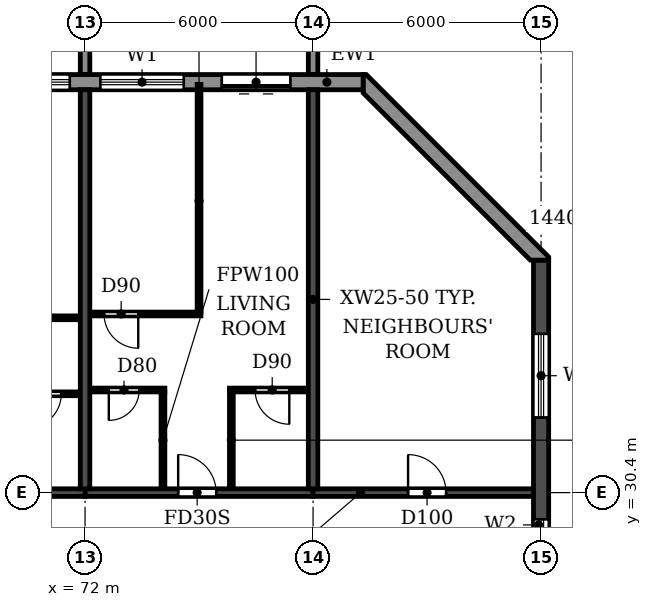
"""IFC4 building model, lengths in metres.
Left out: names, types, materials, properties, quantities, classifications, styles, units other than length and angle.
Written with IfcOpenShell. Run it as: python <this file> out.ifc"""

import sys

from ifc_helpers import new_model, si_unit, direction, frame, frame_2d, origin, place, context, subcontext, project, spatial, polyline, rectangle, outline, extrude, source, transform, mapped, element, fill, save


model = new_model("IFC4")
c1 = context("Model", 3, precision=1e-05, world=origin(), true_north=direction((0.0, 1.0)))
c2 = subcontext(c1, "Body", "Model", "MODEL_VIEW")
j1 = project(units=[si_unit("LENGTHUNIT", "METRE"), si_unit("PLANEANGLEUNIT", "RADIAN")], contexts=[c1])
p1 = place(None, origin())
s1 = spatial("IfcSite", under=j1, at=p1, CompositionType="ELEMENT")
p2 = place(p1, origin())
s2 = spatial("IfcBuilding", under=s1, at=p2, CompositionType="ELEMENT")
p3 = place(p2, frame((0.0, 0.0, 171.9)))
s3 = spatial("IfcBuildingStorey", under=s2, at=p3, CompositionType="ELEMENT", Elevation=171.9)
for number, where, z_axis, x_axis in (
    (1, (72.0, 30.5, 0.0), (0.0, 0.0, 1.0), (0.0, 1.0, 0.0)),
    (2, (78.0, 30.5, 0.0), (0.0, 0.0, 1.0), (0.0, 1.0, 0.0)),
):
    element("IfcWall", number, at=place(p3, frame(where, z_axis=z_axis, x_axis=x_axis)), inside=s3, PredefinedType="SHEAR", context=c2, shape_type="SweptSolid", body=[
        extrude(rectangle(XDim=10.5, YDim=0.25, at=frame_2d((5.25, 0.0))), origin(), (0.0, 0.0, 1.0), 3.08),
    ])
p4 = place(p3, frame((84.0, 4.683, 0.0), z_axis=(0.0, 0.0, 1.0), x_axis=(0.0, 1.0, 0.0)))
e3 = element("IfcWall", 3, at=p4, inside=s3, PredefinedType="SHEAR", context=c2, shape_type="SweptSolid", body=[
    extrude(rectangle(XDim=31.834, YDim=0.4, at=frame_2d((15.917, 0.0))), origin(), (0.0, 0.0, 1.0), 3.08),
])
p5 = place(p4, frame((23.817, 0.0, 0.9)))
e4 = element("IfcOpeningElement", 4, at=p5, cuts=e3, PredefinedType="OPENING", context=c2, shape_type="SweptSolid", body=[
    extrude(rectangle(XDim=1.2, YDim=1.5, at=frame_2d((0.6, 0.75))), frame((0.0, 0.21, 0.0), z_axis=(0.0, -1.0, 0.0), x_axis=(1.0, 0.0, 0.0)), (0.0, 0.0, 1.0), 0.42),
])
p6 = place(p4, frame((8.017, 0.0, 0.9)))
e5 = element("IfcOpeningElement", 5, at=p6, cuts=e3, PredefinedType="OPENING", context=c2, shape_type="SweptSolid", body=[
    extrude(rectangle(XDim=1.2, YDim=1.5, at=frame_2d((0.6, 0.75))), frame((0.0, 0.21, 0.0), z_axis=(0.0, -1.0, 0.0), x_axis=(1.0, 0.0, 0.0)), (0.0, 0.0, 1.0), 0.42),
])
p7 = place(p4, frame((27.694, 0.0, 0.6)))
e6 = element("IfcOpeningElement", 6, at=p7, cuts=e3, PredefinedType="OPENING", context=c2, shape_type="SweptSolid", body=[
    extrude(rectangle(XDim=2.2, YDim=1.8, at=frame_2d((1.1, 0.9))), frame((0.0, 0.21, 0.0), z_axis=(0.0, -1.0, 0.0), x_axis=(1.0, 0.0, 0.0)), (0.0, 0.0, 1.0), 0.42),
])
p8 = place(p4, frame((2.541, 0.0, 0.6)))
e7 = element("IfcOpeningElement", 7, at=p8, cuts=e3, PredefinedType="OPENING", context=c2, shape_type="SweptSolid", body=[
    extrude(rectangle(XDim=2.2, YDim=1.8, at=frame_2d((1.1, 0.9))), frame((0.0, 0.21, 0.0), z_axis=(0.0, -1.0, 0.0), x_axis=(1.0, 0.0, 0.0)), (0.0, 0.0, 1.0), 0.42),
])
p9 = place(p4, frame((15.917, 0.0, 0.9)))
e8 = element("IfcOpeningElement", 8, at=p9, cuts=e3, PredefinedType="OPENING", context=c2, shape_type="SweptSolid", body=[
    extrude(rectangle(XDim=1.2, YDim=1.5, at=frame_2d((0.6, 0.75))), frame((0.0, 0.21, 0.0), z_axis=(0.0, -1.0, 0.0), x_axis=(1.0, 0.0, 0.0)), (0.0, 0.0, 1.0), 0.42),
])
p10 = place(p3, frame((66.0, 30.4, 0.0), z_axis=(0.0, 0.0, 1.0), x_axis=(1.0, 0.0, 0.0)))
e9 = element("IfcWall", 9, at=p10, inside=s3, PredefinedType="SHEAR", context=c2, shape_type="SweptSolid", body=[
    extrude(rectangle(XDim=6.0, YDim=0.2, at=frame_2d((3.0, 0.0))), origin(), (0.0, 0.0, 1.0), 2.48),
])
p11 = place(p10, frame((2.45, 0.0, 0.0)))
e10 = element("IfcOpeningElement", 10, at=p11, cuts=e9, PredefinedType="OPENING", context=c2, shape_type="SweptSolid", body=[
    extrude(rectangle(XDim=1.0, YDim=2.1, at=frame_2d((0.5, 1.05))), frame((0.0, 0.11, 0.0), z_axis=(0.0, -1.0, 0.0), x_axis=(1.0, 0.0, 0.0)), (0.0, 0.0, 1.0), 0.22),
])
p12 = place(p3, frame((72.0, 30.4, 0.0), z_axis=(0.0, 0.0, 1.0), x_axis=(1.0, 0.0, 0.0)))
e11 = element("IfcWall", 11, at=p12, inside=s3, PredefinedType="SHEAR", context=c2, shape_type="SweptSolid", body=[
    extrude(rectangle(XDim=6.0, YDim=0.2, at=frame_2d((3.0, 0.0))), origin(), (0.0, 0.0, 1.0), 2.48),
])
p13 = place(p12, frame((2.45, 0.0, 0.0)))
e12 = element("IfcOpeningElement", 12, at=p13, cuts=e11, PredefinedType="OPENING", context=c2, shape_type="SweptSolid", body=[
    extrude(rectangle(XDim=1.0, YDim=2.1, at=frame_2d((0.5, 1.05))), frame((0.0, 0.11, 0.0), z_axis=(0.0, -1.0, 0.0), x_axis=(1.0, 0.0, 0.0)), (0.0, 0.0, 1.0), 0.22),
])
p14 = place(p3, frame((78.0, 30.4, 0.0), z_axis=(0.0, 0.0, 1.0), x_axis=(1.0, 0.0, 0.0)))
e13 = element("IfcWall", 13, at=p14, inside=s3, PredefinedType="SHEAR", context=c2, shape_type="SweptSolid", body=[
    extrude(rectangle(XDim=5.8, YDim=0.2, at=frame_2d((2.9, 0.0))), origin(), (0.0, 0.0, 1.0), 2.48),
])
p15 = place(p14, frame((2.5, 0.0, 0.0)))
e14 = element("IfcOpeningElement", 14, at=p15, cuts=e13, PredefinedType="OPENING", context=c2, shape_type="SweptSolid", body=[
    extrude(rectangle(XDim=1.0, YDim=2.1, at=frame_2d((0.5, 1.05))), frame((0.0, 0.11, 0.0), z_axis=(0.0, -1.0, 0.0), x_axis=(1.0, 0.0, 0.0)), (0.0, 0.0, 1.0), 0.22),
])
p16 = place(p3, origin())
e15 = element("IfcWall", 15, at=p16, inside=s3, PredefinedType="STANDARD", context=c2, shape_type="SweptSolid", body=[
    extrude(outline(polyline([(84.2, 36.517), (84.2, 36.6), (79.4, 41.4), (79.317, 41.4), (79.317, 40.917), (83.717, 36.517), (84.2, 36.517)])), origin(), (0.0, 0.0, 1.0), 3.08),
])
p17 = place(p3, frame((79.317, 41.2, 0.0), z_axis=(0.0, 0.0, 1.0), x_axis=(-1.0, 0.0, 0.0)))
e16 = element("IfcWall", 16, at=p17, inside=s3, PredefinedType="STANDARD", context=c2, shape_type="SweptSolid", body=[
    extrude(rectangle(XDim=56.634, YDim=0.4, at=frame_2d((28.317, 0.0))), origin(), (0.0, 0.0, 1.0), 3.08),
])
p18 = place(p17, frame((52.717, 0.0, 0.9)))
e17 = element("IfcOpeningElement", 17, at=p18, cuts=e16, PredefinedType="OPENING", context=c2, shape_type="SweptSolid", body=[
    extrude(rectangle(XDim=2.2, YDim=1.5, at=frame_2d((1.1, 0.75))), frame((0.0, 0.21, 0.0), z_axis=(0.0, -1.0, 0.0), x_axis=(1.0, 0.0, 0.0)), (0.0, 0.0, 1.0), 0.42),
])
p19 = place(p17, frame((49.917, 0.0, 0.0)))
e18 = element("IfcOpeningElement", 18, at=p19, cuts=e16, PredefinedType="OPENING", context=c2, shape_type="SweptSolid", body=[
    extrude(rectangle(XDim=1.8, YDim=2.4, at=frame_2d((0.9, 1.2))), frame((0.0, 0.21, 0.0), z_axis=(0.0, -1.0, 0.0), x_axis=(1.0, 0.0, 0.0)), (0.0, 0.0, 1.0), 0.42),
])
p20 = place(p17, frame((46.717, 0.0, 0.9)))
e19 = element("IfcOpeningElement", 19, at=p20, cuts=e16, PredefinedType="OPENING", context=c2, shape_type="SweptSolid", body=[
    extrude(rectangle(XDim=2.2, YDim=1.5, at=frame_2d((1.1, 0.75))), frame((0.0, 0.21, 0.0), z_axis=(0.0, -1.0, 0.0), x_axis=(1.0, 0.0, 0.0)), (0.0, 0.0, 1.0), 0.42),
])
p21 = place(p17, frame((43.717, 0.0, 0.9)))
e20 = element("IfcOpeningElement", 20, at=p21, cuts=e16, PredefinedType="OPENING", context=c2, shape_type="SweptSolid", body=[
    extrude(rectangle(XDim=2.2, YDim=1.5, at=frame_2d((1.1, 0.75))), frame((0.0, 0.21, 0.0), z_axis=(0.0, -1.0, 0.0), x_axis=(1.0, 0.0, 0.0)), (0.0, 0.0, 1.0), 0.42),
])
p22 = place(p17, frame((40.917, 0.0, 0.0)))
e21 = element("IfcOpeningElement", 21, at=p22, cuts=e16, PredefinedType="OPENING", context=c2, shape_type="SweptSolid", body=[
    extrude(rectangle(XDim=1.8, YDim=2.4, at=frame_2d((0.9, 1.2))), frame((0.0, 0.21, 0.0), z_axis=(0.0, -1.0, 0.0), x_axis=(1.0, 0.0, 0.0)), (0.0, 0.0, 1.0), 0.42),
])
p23 = place(p17, frame((37.717, 0.0, 0.9)))
e22 = element("IfcOpeningElement", 22, at=p23, cuts=e16, PredefinedType="OPENING", context=c2, shape_type="SweptSolid", body=[
    extrude(rectangle(XDim=2.2, YDim=1.5, at=frame_2d((1.1, 0.75))), frame((0.0, 0.21, 0.0), z_axis=(0.0, -1.0, 0.0), x_axis=(1.0, 0.0, 0.0)), (0.0, 0.0, 1.0), 0.42),
])
p24 = place(p17, frame((34.717, 0.0, 0.9)))
e23 = element("IfcOpeningElement", 23, at=p24, cuts=e16, PredefinedType="OPENING", context=c2, shape_type="SweptSolid", body=[
    extrude(rectangle(XDim=2.2, YDim=1.5, at=frame_2d((1.1, 0.75))), frame((0.0, 0.21, 0.0), z_axis=(0.0, -1.0, 0.0), x_axis=(1.0, 0.0, 0.0)), (0.0, 0.0, 1.0), 0.42),
])
p25 = place(p17, frame((31.717, 0.0, 0.9)))
e24 = element("IfcOpeningElement", 24, at=p25, cuts=e16, PredefinedType="OPENING", context=c2, shape_type="SweptSolid", body=[
    extrude(rectangle(XDim=2.2, YDim=1.5, at=frame_2d((1.1, 0.75))), frame((0.0, 0.21, 0.0), z_axis=(0.0, -1.0, 0.0), x_axis=(1.0, 0.0, 0.0)), (0.0, 0.0, 1.0), 0.42),
])
p26 = place(p17, frame((28.717, 0.0, 0.9)))
e25 = element("IfcOpeningElement", 25, at=p26, cuts=e16, PredefinedType="OPENING", context=c2, shape_type="SweptSolid", body=[
    extrude(rectangle(XDim=2.2, YDim=1.5, at=frame_2d((1.1, 0.75))), frame((0.0, 0.21, 0.0), z_axis=(0.0, -1.0, 0.0), x_axis=(1.0, 0.0, 0.0)), (0.0, 0.0, 1.0), 0.42),
])
p27 = place(p17, frame((25.917, 0.0, 0.0)))
e26 = element("IfcOpeningElement", 26, at=p27, cuts=e16, PredefinedType="OPENING", context=c2, shape_type="SweptSolid", body=[
    extrude(rectangle(XDim=1.8, YDim=2.4, at=frame_2d((0.9, 1.2))), frame((0.0, 0.21, 0.0), z_axis=(0.0, -1.0, 0.0), x_axis=(1.0, 0.0, 0.0)), (0.0, 0.0, 1.0), 0.42),
])
p28 = place(p17, frame((22.717, 0.0, 0.9)))
e27 = element("IfcOpeningElement", 27, at=p28, cuts=e16, PredefinedType="OPENING", context=c2, shape_type="SweptSolid", body=[
    extrude(rectangle(XDim=2.2, YDim=1.5, at=frame_2d((1.1, 0.75))), frame((0.0, 0.21, 0.0), z_axis=(0.0, -1.0, 0.0), x_axis=(1.0, 0.0, 0.0)), (0.0, 0.0, 1.0), 0.42),
])
p29 = place(p17, frame((19.917, 0.0, 0.0)))
e28 = element("IfcOpeningElement", 28, at=p29, cuts=e16, PredefinedType="OPENING", context=c2, shape_type="SweptSolid", body=[
    extrude(rectangle(XDim=1.8, YDim=2.4, at=frame_2d((0.9, 1.2))), frame((0.0, 0.21, 0.0), z_axis=(0.0, -1.0, 0.0), x_axis=(1.0, 0.0, 0.0)), (0.0, 0.0, 1.0), 0.42),
])
p30 = place(p17, frame((16.717, 0.0, 0.9)))
e29 = element("IfcOpeningElement", 29, at=p30, cuts=e16, PredefinedType="OPENING", context=c2, shape_type="SweptSolid", body=[
    extrude(rectangle(XDim=2.2, YDim=1.5, at=frame_2d((1.1, 0.75))), frame((0.0, 0.21, 0.0), z_axis=(0.0, -1.0, 0.0), x_axis=(1.0, 0.0, 0.0)), (0.0, 0.0, 1.0), 0.42),
])
p31 = place(p17, frame((13.717, 0.0, 0.9)))
e30 = element("IfcOpeningElement", 30, at=p31, cuts=e16, PredefinedType="OPENING", context=c2, shape_type="SweptSolid", body=[
    extrude(rectangle(XDim=2.2, YDim=1.5, at=frame_2d((1.1, 0.75))), frame((0.0, 0.21, 0.0), z_axis=(0.0, -1.0, 0.0), x_axis=(1.0, 0.0, 0.0)), (0.0, 0.0, 1.0), 0.42),
])
p32 = place(p17, frame((10.917, 0.0, 0.0)))
e31 = element("IfcOpeningElement", 31, at=p32, cuts=e16, PredefinedType="OPENING", context=c2, shape_type="SweptSolid", body=[
    extrude(rectangle(XDim=1.8, YDim=2.4, at=frame_2d((0.9, 1.2))), frame((0.0, 0.21, 0.0), z_axis=(0.0, -1.0, 0.0), x_axis=(1.0, 0.0, 0.0)), (0.0, 0.0, 1.0), 0.42),
])
p33 = place(p17, frame((7.717, 0.0, 0.9)))
e32 = element("IfcOpeningElement", 32, at=p33, cuts=e16, PredefinedType="OPENING", context=c2, shape_type="SweptSolid", body=[
    extrude(rectangle(XDim=2.2, YDim=1.5, at=frame_2d((1.1, 0.75))), frame((0.0, 0.21, 0.0), z_axis=(0.0, -1.0, 0.0), x_axis=(1.0, 0.0, 0.0)), (0.0, 0.0, 1.0), 0.42),
])
p34 = place(p17, frame((4.717, 0.0, 0.9)))
e33 = element("IfcOpeningElement", 33, at=p34, cuts=e16, PredefinedType="OPENING", context=c2, shape_type="SweptSolid", body=[
    extrude(rectangle(XDim=2.2, YDim=1.5, at=frame_2d((1.1, 0.75))), frame((0.0, 0.21, 0.0), z_axis=(0.0, -1.0, 0.0), x_axis=(1.0, 0.0, 0.0)), (0.0, 0.0, 1.0), 0.42),
])
p35 = place(p17, frame((1.917, 0.0, 0.0)))
e34 = element("IfcOpeningElement", 34, at=p35, cuts=e16, PredefinedType="OPENING", context=c2, shape_type="SweptSolid", body=[
    extrude(rectangle(XDim=1.8, YDim=2.4, at=frame_2d((0.9, 1.2))), frame((0.0, 0.21, 0.0), z_axis=(0.0, -1.0, 0.0), x_axis=(1.0, 0.0, 0.0)), (0.0, 0.0, 1.0), 0.42),
])
m1 = source(origin(), c2, "Body", "SweptSolid", [
    extrude(outline(polyline([(0.0, 0.0), (0.25, 0.0), (0.25, 3.1), (0.0, 3.1), (0.0, 0.0)])), origin(), (0.0, 0.0, 1.0), 3.1),
])
for number, where in (
    (35, (71.875, 41.4, 0.0)),
    (36, (77.875, 41.4, 0.0)),
):
    element("IfcWall", number, at=place(p3, frame(where)), inside=s3, PredefinedType="STANDARD", context=c2, shape_type="MappedRepresentation", body=[
        mapped(m1, transform((0.0, 0.0, 0.0))),
    ])
p36 = place(p3, frame((69.8, 33.0, 0.0), z_axis=(0.0, 0.0, 1.0), x_axis=(1.0, 0.0, 0.0)))
e37 = element("IfcWall", 37, at=p36, inside=s3, PredefinedType="PARTITIONING", context=c2, shape_type="SweptSolid", body=[
    extrude(rectangle(XDim=2.065, YDim=0.1, at=frame_2d((1.032, 0.0))), origin(), (0.0, 0.0, 1.0), 3.08),
])
p37 = place(p36, frame((0.675, 0.0, 0.0)))
e38 = element("IfcOpeningElement", 38, at=p37, cuts=e37, PredefinedType="OPENING", context=c2, shape_type="SweptSolid", body=[
    extrude(rectangle(XDim=0.9, YDim=2.1, at=frame_2d((0.45, 1.05))), frame((0.0, 0.06, 0.0), z_axis=(0.0, -1.0, 0.0), x_axis=(1.0, 0.0, 0.0)), (0.0, 0.0, 1.0), 0.12),
])
p38 = place(p3, frame((72.135, 33.1, 0.0), z_axis=(0.0, 0.0, 1.0), x_axis=(1.0, 0.0, 0.0)))
e39 = element("IfcWall", 39, at=p38, inside=s3, PredefinedType="PARTITIONING", context=c2, shape_type="SweptSolid", body=[
    extrude(rectangle(XDim=1.965, YDim=0.1, at=frame_2d((0.982, 0.0))), origin(), (0.0, 0.0, 1.0), 3.08),
])
p39 = place(p38, frame((0.49, 0.0, 0.0)))
e40 = element("IfcOpeningElement", 40, at=p39, cuts=e39, PredefinedType="OPENING", context=c2, shape_type="SweptSolid", body=[
    extrude(rectangle(XDim=0.8, YDim=2.1, at=frame_2d((0.4, 1.05))), frame((0.0, 0.06, 0.0), z_axis=(0.0, -1.0, 0.0), x_axis=(1.0, 0.0, 0.0)), (0.0, 0.0, 1.0), 0.12),
])
p40 = place(p3, frame((75.8, 33.1, 0.0), z_axis=(0.0, 0.0, 1.0), x_axis=(1.0, 0.0, 0.0)))
e41 = element("IfcWall", 41, at=p40, inside=s3, PredefinedType="PARTITIONING", context=c2, shape_type="SweptSolid", body=[
    extrude(rectangle(XDim=2.065, YDim=0.1, at=frame_2d((1.032, 0.0))), origin(), (0.0, 0.0, 1.0), 3.08),
])
p41 = place(p40, frame((0.675, 0.0, 0.0)))
e42 = element("IfcOpeningElement", 42, at=p41, cuts=e41, PredefinedType="OPENING", context=c2, shape_type="SweptSolid", body=[
    extrude(rectangle(XDim=0.9, YDim=2.1, at=frame_2d((0.45, 1.05))), frame((0.0, 0.06, 0.0), z_axis=(0.0, -1.0, 0.0), x_axis=(1.0, 0.0, 0.0)), (0.0, 0.0, 1.0), 0.12),
])
p42 = place(p3, frame((68.95, 35.0, 0.0), z_axis=(0.0, 0.0, 1.0), x_axis=(1.0, 0.0, 0.0)))
e43 = element("IfcWall", 43, at=p42, inside=s3, PredefinedType="PARTITIONING", context=c2, shape_type="SweptSolid", body=[
    extrude(rectangle(XDim=2.915, YDim=0.1, at=frame_2d((1.458, 0.0))), origin(), (0.0, 0.0, 1.0), 3.08),
])
p43 = place(p42, frame((0.55, 0.0, 0.0)))
e44 = element("IfcOpeningElement", 44, at=p43, cuts=e43, PredefinedType="OPENING", context=c2, shape_type="SweptSolid", body=[
    extrude(rectangle(XDim=0.9, YDim=2.1, at=frame_2d((0.45, 1.05))), frame((0.0, 0.06, 0.0), z_axis=(0.0, -1.0, 0.0), x_axis=(1.0, 0.0, 0.0)), (0.0, 0.0, 1.0), 0.12),
])
p44 = place(p3, frame((72.135, 35.1, 0.0), z_axis=(0.0, 0.0, 1.0), x_axis=(1.0, 0.0, 0.0)))
e45 = element("IfcWall", 45, at=p44, inside=s3, PredefinedType="PARTITIONING", context=c2, shape_type="SweptSolid", body=[
    extrude(rectangle(XDim=2.915, YDim=0.1, at=frame_2d((1.458, 0.0))), origin(), (0.0, 0.0, 1.0), 3.08),
])
p45 = place(p44, frame((0.365, 0.0, 0.0)))
e46 = element("IfcOpeningElement", 46, at=p45, cuts=e45, PredefinedType="OPENING", context=c2, shape_type="SweptSolid", body=[
    extrude(rectangle(XDim=0.9, YDim=2.1, at=frame_2d((0.45, 1.05))), frame((0.0, 0.06, 0.0), z_axis=(0.0, -1.0, 0.0), x_axis=(1.0, 0.0, 0.0)), (0.0, 0.0, 1.0), 0.12),
])
p46 = place(p3, frame((74.05, 30.51, 0.0), z_axis=(0.0, 0.0, 1.0), x_axis=(0.0, 1.0, 0.0)))
e47 = element("IfcWall", 47, at=p46, inside=s3, PredefinedType="PARTITIONING", context=c2, shape_type="SweptSolid", body=[
    extrude(rectangle(XDim=2.54, YDim=0.1, at=frame_2d((1.27, 0.0))), origin(), (0.0, 0.0, 1.0), 3.08),
])
p47 = place(p3, frame((75.0, 35.15, 0.0), z_axis=(0.0, 0.0, 1.0), x_axis=(0.0, 1.0, 0.0)))
e48 = element("IfcWall", 48, at=p47, inside=s3, PredefinedType="PARTITIONING", context=c2, shape_type="SweptSolid", body=[
    extrude(rectangle(XDim=5.99, YDim=0.1, at=frame_2d((2.995, 0.0))), origin(), (0.0, 0.0, 1.0), 3.08),
])
p48 = place(p3, frame((75.85, 30.51, 0.0), z_axis=(0.0, 0.0, 1.0), x_axis=(0.0, 1.0, 0.0)))
e49 = element("IfcWall", 49, at=p48, inside=s3, PredefinedType="PARTITIONING", context=c2, shape_type="SweptSolid", body=[
    extrude(rectangle(XDim=2.54, YDim=0.1, at=frame_2d((1.27, 0.0))), origin(), (0.0, 0.0, 1.0), 3.08),
])
p49 = place(p5, origin())
e50 = element("IfcWindow", 50, at=p49, inside=s3, PartitioningType="SINGLE_PANEL", PredefinedType="WINDOW", context=c2, shape_type="SweptSolid", body=[
    extrude(rectangle(XDim=1.2, YDim=1.5, at=frame_2d((0.6, 0.75))), frame((0.0, 0.03, 0.0), z_axis=(0.0, -1.0, 0.0), x_axis=(1.0, 0.0, 0.0)), (0.0, 0.0, 1.0), 0.06),
])
fill(e4, e50)
p50 = place(p7, origin())
e51 = element("IfcWindow", 51, at=p50, inside=s3, PartitioningType="DOUBLE_PANEL_HORIZONTAL", PredefinedType="WINDOW", context=c2, shape_type="SweptSolid", body=[
    extrude(rectangle(XDim=2.2, YDim=1.8, at=frame_2d((1.1, 0.9))), frame((0.0, 0.03, 0.0), z_axis=(0.0, -1.0, 0.0), x_axis=(1.0, 0.0, 0.0)), (0.0, 0.0, 1.0), 0.06),
])
fill(e6, e51)
p51 = place(p33, origin())
e52 = element("IfcWindow", 52, at=p51, inside=s3, PartitioningType="DOUBLE_PANEL_HORIZONTAL", PredefinedType="WINDOW", context=c2, shape_type="SweptSolid", body=[
    extrude(rectangle(XDim=2.2, YDim=1.5, at=frame_2d((1.1, 0.75))), frame((0.0, 0.03, 0.0), z_axis=(0.0, -1.0, 0.0), x_axis=(1.0, 0.0, 0.0)), (0.0, 0.0, 1.0), 0.06),
])
fill(e32, e52)
p52 = place(p34, origin())
e53 = element("IfcWindow", 53, at=p52, inside=s3, PartitioningType="DOUBLE_PANEL_HORIZONTAL", PredefinedType="WINDOW", context=c2, shape_type="SweptSolid", body=[
    extrude(rectangle(XDim=2.2, YDim=1.5, at=frame_2d((1.1, 0.75))), frame((0.0, 0.03, 0.0), z_axis=(0.0, -1.0, 0.0), x_axis=(1.0, 0.0, 0.0)), (0.0, 0.0, 1.0), 0.06),
])
fill(e33, e53)
p53 = place(p35, origin())
e54 = element("IfcDoor", 54, at=p53, inside=s3, OperationType="DOUBLE_DOOR_SLIDING", PredefinedType="DOOR", context=c2, shape_type="SweptSolid", body=[
    extrude(rectangle(XDim=1.8, YDim=2.4, at=frame_2d((0.9, 1.2))), frame((0.0, 0.025, 0.0), z_axis=(0.0, -1.0, 0.0), x_axis=(1.0, 0.0, 0.0)), (0.0, 0.0, 1.0), 0.05),
])
fill(e34, e54)
p54 = place(p37, frame((0.9, 0.0, 0.0), z_axis=(0.0, 0.0, 1.0), x_axis=(-1.0, 0.0, 0.0)))
e55 = element("IfcDoor", 55, at=p54, inside=s3, OperationType="SINGLE_SWING_RIGHT", PredefinedType="DOOR", context=c2, shape_type="SweptSolid", body=[
    extrude(rectangle(XDim=0.9, YDim=2.1, at=frame_2d((0.45, 1.05))), frame((0.0, 0.025, 0.0), z_axis=(0.0, -1.0, 0.0), x_axis=(1.0, 0.0, 0.0)), (0.0, 0.0, 1.0), 0.05),
])
fill(e38, e55)
p55 = place(p45, frame((0.9, 0.0, 0.0), z_axis=(0.0, 0.0, 1.0), x_axis=(-1.0, 0.0, 0.0)))
e56 = element("IfcDoor", 56, at=p55, inside=s3, OperationType="SINGLE_SWING_LEFT", PredefinedType="DOOR", context=c2, shape_type="SweptSolid", body=[
    extrude(rectangle(XDim=0.9, YDim=2.1, at=frame_2d((0.45, 1.05))), frame((0.0, 0.025, 0.0), z_axis=(0.0, -1.0, 0.0), x_axis=(1.0, 0.0, 0.0)), (0.0, 0.0, 1.0), 0.05),
])
fill(e46, e56)
p56 = place(p39, frame((0.8, 0.0, 0.0), z_axis=(0.0, 0.0, 1.0), x_axis=(-1.0, 0.0, 0.0)))
e57 = element("IfcDoor", 57, at=p56, inside=s3, OperationType="SINGLE_SWING_RIGHT", PredefinedType="DOOR", context=c2, shape_type="SweptSolid", body=[
    extrude(rectangle(XDim=0.8, YDim=2.1, at=frame_2d((0.4, 1.05))), frame((0.0, 0.025, 0.0), z_axis=(0.0, -1.0, 0.0), x_axis=(1.0, 0.0, 0.0)), (0.0, 0.0, 1.0), 0.05),
])
fill(e40, e57)
p57 = place(p13, origin())
e58 = element("IfcDoor", 58, at=p57, inside=s3, OperationType="SINGLE_SWING_LEFT", PredefinedType="DOOR", context=c2, shape_type="SweptSolid", body=[
    extrude(rectangle(XDim=1.0, YDim=2.1, at=frame_2d((0.5, 1.05))), frame((0.0, 0.025, 0.0), z_axis=(0.0, -1.0, 0.0), x_axis=(1.0, 0.0, 0.0)), (0.0, 0.0, 1.0), 0.05),
])
fill(e12, e58)
p58 = place(p41, frame((0.9, 0.0, 0.0), z_axis=(0.0, 0.0, 1.0), x_axis=(-1.0, 0.0, 0.0)))
e59 = element("IfcDoor", 59, at=p58, inside=s3, OperationType="SINGLE_SWING_LEFT", PredefinedType="DOOR", context=c2, shape_type="SweptSolid", body=[
    extrude(rectangle(XDim=0.9, YDim=2.1, at=frame_2d((0.45, 1.05))), frame((0.0, 0.025, 0.0), z_axis=(0.0, -1.0, 0.0), x_axis=(1.0, 0.0, 0.0)), (0.0, 0.0, 1.0), 0.05),
])
fill(e42, e59)
p59 = place(p15, origin())
e60 = element("IfcDoor", 60, at=p59, inside=s3, OperationType="SINGLE_SWING_LEFT", PredefinedType="DOOR", context=c2, shape_type="SweptSolid", body=[
    extrude(rectangle(XDim=1.0, YDim=2.1, at=frame_2d((0.5, 1.05))), frame((0.0, 0.025, 0.0), z_axis=(0.0, -1.0, 0.0), x_axis=(1.0, 0.0, 0.0)), (0.0, 0.0, 1.0), 0.05),
])
fill(e14, e60)
save(model, sys.argv[1])
